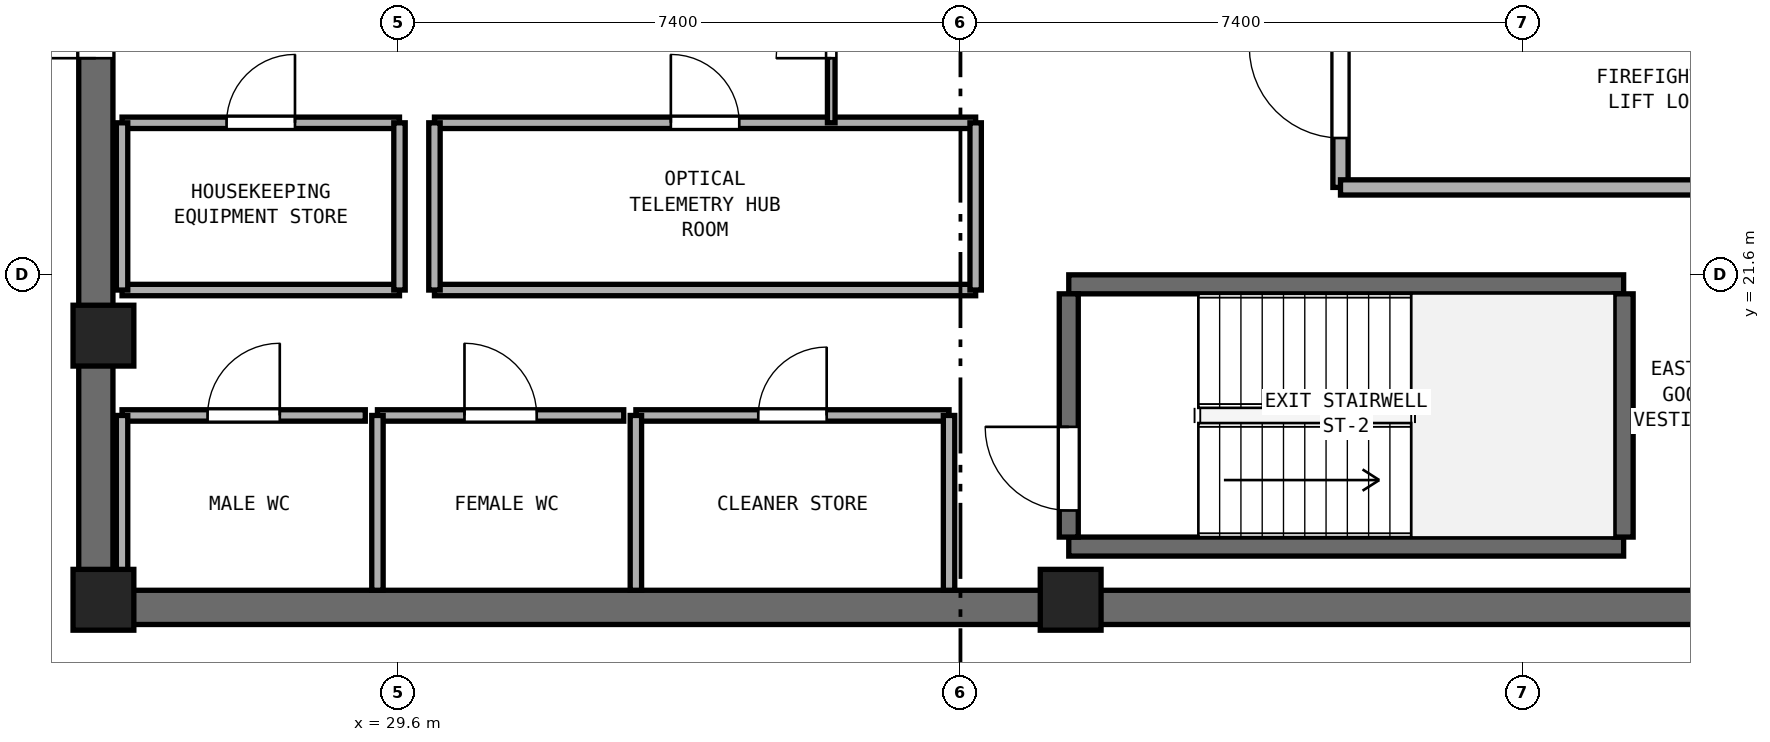
"""IFC4 building model, lengths in metres.
Left out: names, types, materials, properties, quantities, classifications, styles, units other than length and angle.
Written with IfcOpenShell. Run it as: python <this file> out.ifc"""

import sys

from ifc_helpers import new_model, si_unit, direction, frame, frame_2d, origin, origin_2d, place, context, subcontext, project, spatial, rectangle, extrude, element, fill, save


model = new_model("IFC4")
c1 = context("Model", 3, precision=1e-05, world=origin(), true_north=direction((0.0, 1.0)))
c2 = subcontext(c1, "Body", "Model", "MODEL_VIEW")
j1 = project(units=[si_unit("LENGTHUNIT", "METRE"), si_unit("PLANEANGLEUNIT", "RADIAN")], contexts=[c1])
p1 = place(None, origin())
s1 = spatial("IfcSite", under=j1, at=p1, CompositionType="ELEMENT")
p2 = place(p1, origin())
s2 = spatial("IfcBuilding", under=s1, at=p2, CompositionType="ELEMENT")
p3 = place(p2, frame((0.0, 0.0, 282.0)))
s3 = spatial("IfcBuildingStorey", under=s2, at=p3, CompositionType="ELEMENT", Elevation=282.0)
p4 = place(p3, frame((25.4, 17.225, 0.0), z_axis=(0.0, 0.0, 1.0), x_axis=(1.0, 0.0, 0.0)))
e1 = element("IfcWall", 1, at=p4, inside=s3, PredefinedType="SHEAR", context=c2, shape_type="SweptSolid", body=[
    extrude(rectangle(XDim=23.2, YDim=0.45, at=frame_2d((11.6, 0.0))), origin(), (0.0, 0.0, 1.0), 3.54),
])
p5 = place(p3, frame((25.625, 17.45, 0.0), z_axis=(0.0, 0.0, 1.0), x_axis=(0.0, 1.0, 0.0)))
e2 = element("IfcWall", 2, at=p5, inside=s3, PredefinedType="SHEAR", context=c2, shape_type="SweptSolid", body=[
    extrude(rectangle(XDim=15.5, YDim=0.45, at=frame_2d((7.75, 0.0))), origin(), (0.0, 0.0, 1.0), 3.54),
])
p6 = place(p5, frame((7.0, 0.0, 0.0)))
e3 = element("IfcOpeningElement", 3, at=p6, cuts=e2, PredefinedType="OPENING", context=c2, shape_type="SweptSolid", body=[
    extrude(rectangle(XDim=1.5, YDim=2.15, at=frame_2d((0.75, 1.075))), frame((0.0, 0.235, 0.0), z_axis=(0.0, -1.0, 0.0), x_axis=(1.0, 0.0, 0.0)), (0.0, 0.0, 1.0), 0.47),
])
for number, where, z_axis, x_axis in (
    (4, (25.725, 17.325, 0.0), (0.0, 0.0, 1.0), (1.0, 0.0, 0.0)),
    (5, (38.45, 17.325, 0.0), (0.0, 0.0, 1.0), (1.0, 0.0, 0.0)),
    (6, (25.725, 20.8, 0.0), (0.0, 0.0, 1.0), (1.0, 0.0, 0.0)),
):
    element("IfcColumn", number, at=place(p3, frame(where, z_axis=z_axis, x_axis=x_axis)), inside=s3, PredefinedType="PILASTER", context=c2, shape_type="SweptSolid", body=[
        extrude(rectangle(XDim=0.8, YDim=0.8, at=origin_2d()), origin(), (0.0, 0.0, 1.0), 3.8),
    ])
for number, where, z_axis, x_axis in (
    (7, (38.425, 18.025, 0.0), (0.0, 0.0, 1.0), (1.0, 0.0, 0.0)),
    (8, (38.425, 21.475, 0.0), (0.0, 0.0, 1.0), (1.0, 0.0, 0.0)),
):
    element("IfcWall", number, at=place(p3, frame(where, z_axis=z_axis, x_axis=x_axis)), inside=s3, PredefinedType="SHEAR", context=c2, shape_type="SweptSolid", body=[
        extrude(rectangle(XDim=7.3, YDim=0.25, at=frame_2d((3.65, 0.0))), origin(), (0.0, 0.0, 1.0), 3.54),
    ])
p7 = place(p3, frame((38.425, 18.15, 0.0), z_axis=(0.0, 0.0, 1.0), x_axis=(0.0, 1.0, 0.0)))
e9 = element("IfcWall", 9, at=p7, inside=s3, PredefinedType="SHEAR", context=c2, shape_type="SweptSolid", body=[
    extrude(rectangle(XDim=3.2, YDim=0.25, at=frame_2d((1.6, 0.0))), origin(), (0.0, 0.0, 1.0), 3.54),
])
p8 = place(p7, frame((0.35, 0.0, 0.0)))
e10 = element("IfcOpeningElement", 10, at=p8, cuts=e9, PredefinedType="OPENING", context=c2, shape_type="SweptSolid", body=[
    extrude(rectangle(XDim=1.1, YDim=2.15, at=frame_2d((0.55, 1.075))), frame((0.0, 0.135, 0.0), z_axis=(0.0, -1.0, 0.0), x_axis=(1.0, 0.0, 0.0)), (0.0, 0.0, 1.0), 0.27),
])
p9 = place(p3, frame((45.725, 18.15, 0.0), z_axis=(0.0, 0.0, 1.0), x_axis=(0.0, 1.0, 0.0)))
e11 = element("IfcWall", 11, at=p9, inside=s3, PredefinedType="SHEAR", context=c2, shape_type="SweptSolid", body=[
    extrude(rectangle(XDim=3.2, YDim=0.25, at=frame_2d((1.6, 0.0))), origin(), (0.0, 0.0, 1.0), 3.54),
])
p10 = place(p3, frame((42.0, 22.75, 0.0), z_axis=(0.0, 0.0, 1.0), x_axis=(0.0, 1.0, 0.0)))
e12 = element("IfcWall", 12, at=p10, inside=s3, PredefinedType="SOLIDWALL", context=c2, shape_type="SweptSolid", body=[
    extrude(rectangle(XDim=6.05, YDim=0.2, at=frame_2d((3.025, 0.0))), origin(), (0.0, 0.0, 1.0), 3.54),
])
p11 = place(p10, frame((0.65, 0.0, 0.0)))
e13 = element("IfcOpeningElement", 13, at=p11, cuts=e12, PredefinedType="OPENING", context=c2, shape_type="SweptSolid", body=[
    extrude(rectangle(XDim=1.2, YDim=2.15, at=frame_2d((0.6, 1.075))), frame((0.0, 0.11, 0.0), z_axis=(0.0, -1.0, 0.0), x_axis=(1.0, 0.0, 0.0)), (0.0, 0.0, 1.0), 0.22),
])
p12 = place(p3, frame((42.0, 22.75, 0.0), z_axis=(0.0, 0.0, 1.0), x_axis=(1.0, 0.0, 0.0)))
e14 = element("IfcWall", 14, at=p12, inside=s3, PredefinedType="SOLIDWALL", context=c2, shape_type="SweptSolid", body=[
    extrude(rectangle(XDim=6.15, YDim=0.2, at=frame_2d((3.075, 0.0))), origin(), (0.0, 0.0, 1.0), 3.54),
])
p13 = place(p3, frame((25.97, 19.75, 0.0), z_axis=(0.0, 0.0, 1.0), x_axis=(1.0, 0.0, 0.0)))
e15 = element("IfcWall", 15, at=p13, inside=s3, PredefinedType="PARTITIONING", context=c2, shape_type="SweptSolid", body=[
    extrude(rectangle(XDim=3.2, YDim=0.15, at=frame_2d((1.6, 0.0))), origin(), (0.0, 0.0, 1.0), 3.54),
])
p14 = place(p13, frame((1.125, 0.0, 0.0)))
e16 = element("IfcOpeningElement", 16, at=p14, cuts=e15, PredefinedType="OPENING", context=c2, shape_type="SweptSolid", body=[
    extrude(rectangle(XDim=0.95, YDim=2.1, at=frame_2d((0.475, 1.05))), frame((0.0, 0.085, 0.0), z_axis=(0.0, -1.0, 0.0), x_axis=(1.0, 0.0, 0.0)), (0.0, 0.0, 1.0), 0.17),
])
p15 = place(p3, frame((25.97, 17.45, 0.0), z_axis=(0.0, 0.0, 1.0), x_axis=(0.0, 1.0, 0.0)))
e17 = element("IfcWall", 17, at=p15, inside=s3, PredefinedType="PARTITIONING", context=c2, shape_type="SweptSolid", body=[
    extrude(rectangle(XDim=2.3, YDim=0.15, at=frame_2d((1.15, 0.0))), origin(), (0.0, 0.0, 1.0), 2.64),
])
p16 = place(p3, frame((29.33, 19.75, 0.0), z_axis=(0.0, 0.0, 1.0), x_axis=(1.0, 0.0, 0.0)))
e18 = element("IfcWall", 18, at=p16, inside=s3, PredefinedType="PARTITIONING", context=c2, shape_type="SweptSolid", body=[
    extrude(rectangle(XDim=3.24, YDim=0.15, at=frame_2d((1.62, 0.0))), origin(), (0.0, 0.0, 1.0), 3.54),
])
p17 = place(p16, frame((1.145, 0.0, 0.0)))
e19 = element("IfcOpeningElement", 19, at=p17, cuts=e18, PredefinedType="OPENING", context=c2, shape_type="SweptSolid", body=[
    extrude(rectangle(XDim=0.95, YDim=2.1, at=frame_2d((0.475, 1.05))), frame((0.0, 0.085, 0.0), z_axis=(0.0, -1.0, 0.0), x_axis=(1.0, 0.0, 0.0)), (0.0, 0.0, 1.0), 0.17),
])
p18 = place(p3, frame((29.33, 17.45, 0.0), z_axis=(0.0, 0.0, 1.0), x_axis=(0.0, 1.0, 0.0)))
e20 = element("IfcWall", 20, at=p18, inside=s3, PredefinedType="PARTITIONING", context=c2, shape_type="SweptSolid", body=[
    extrude(rectangle(XDim=2.3, YDim=0.15, at=frame_2d((1.15, 0.0))), origin(), (0.0, 0.0, 1.0), 3.54),
])
p19 = place(p3, frame((32.73, 19.75, 0.0), z_axis=(0.0, 0.0, 1.0), x_axis=(1.0, 0.0, 0.0)))
e21 = element("IfcWall", 21, at=p19, inside=s3, PredefinedType="PARTITIONING", context=c2, shape_type="SweptSolid", body=[
    extrude(rectangle(XDim=4.12, YDim=0.15, at=frame_2d((2.06, 0.0))), origin(), (0.0, 0.0, 1.0), 3.54),
])
p20 = place(p19, frame((1.61, 0.0, 0.0)))
e22 = element("IfcOpeningElement", 22, at=p20, cuts=e21, PredefinedType="OPENING", context=c2, shape_type="SweptSolid", body=[
    extrude(rectangle(XDim=0.9, YDim=2.1, at=frame_2d((0.45, 1.05))), frame((0.0, 0.085, 0.0), z_axis=(0.0, -1.0, 0.0), x_axis=(1.0, 0.0, 0.0)), (0.0, 0.0, 1.0), 0.17),
])
for number, where, z_axis, x_axis in (
    (23, (32.73, 17.45, 0.0), (0.0, 0.0, 1.0), (0.0, 1.0, 0.0)),
    (24, (36.85, 17.45, 0.0), (0.0, 0.0, 1.0), (0.0, 1.0, 0.0)),
):
    element("IfcWall", number, at=place(p3, frame(where, z_axis=z_axis, x_axis=x_axis)), inside=s3, PredefinedType="PARTITIONING", context=c2, shape_type="SweptSolid", body=[
        extrude(rectangle(XDim=2.3, YDim=0.15, at=frame_2d((1.15, 0.0))), origin(), (0.0, 0.0, 1.0), 3.54),
    ])
p21 = place(p3, frame((25.97, 21.4, 0.0), z_axis=(0.0, 0.0, 1.0), x_axis=(1.0, 0.0, 0.0)))
e25 = element("IfcWall", 25, at=p21, inside=s3, PredefinedType="PARTITIONING", context=c2, shape_type="SweptSolid", body=[
    extrude(rectangle(XDim=3.65, YDim=0.15, at=frame_2d((1.825, 0.0))), origin(), (0.0, 0.0, 1.0), 3.54),
])
p22 = place(p3, frame((25.97, 23.6, 0.0), z_axis=(0.0, 0.0, 1.0), x_axis=(1.0, 0.0, 0.0)))
e26 = element("IfcWall", 26, at=p22, inside=s3, PredefinedType="PARTITIONING", context=c2, shape_type="SweptSolid", body=[
    extrude(rectangle(XDim=3.65, YDim=0.15, at=frame_2d((1.825, 0.0))), origin(), (0.0, 0.0, 1.0), 3.54),
])
p23 = place(p22, frame((1.375, 0.0, 0.0)))
e27 = element("IfcOpeningElement", 27, at=p23, cuts=e26, PredefinedType="OPENING", context=c2, shape_type="SweptSolid", body=[
    extrude(rectangle(XDim=0.9, YDim=2.1, at=frame_2d((0.45, 1.05))), frame((0.0, 0.085, 0.0), z_axis=(0.0, -1.0, 0.0), x_axis=(1.0, 0.0, 0.0)), (0.0, 0.0, 1.0), 0.17),
])
p24 = place(p3, frame((25.97, 21.4, 0.0), z_axis=(0.0, 0.0, 1.0), x_axis=(0.0, 1.0, 0.0)))
e28 = element("IfcWall", 28, at=p24, inside=s3, PredefinedType="PARTITIONING", context=c2, shape_type="SweptSolid", body=[
    extrude(rectangle(XDim=2.2, YDim=0.15, at=frame_2d((1.1, 0.0))), origin(), (0.0, 0.0, 1.0), 2.64),
])
p25 = place(p3, frame((29.62, 21.4, 0.0), z_axis=(0.0, 0.0, 1.0), x_axis=(0.0, 1.0, 0.0)))
e29 = element("IfcWall", 29, at=p25, inside=s3, PredefinedType="PARTITIONING", context=c2, shape_type="SweptSolid", body=[
    extrude(rectangle(XDim=2.2, YDim=0.15, at=frame_2d((1.1, 0.0))), origin(), (0.0, 0.0, 1.0), 3.54),
])
p26 = place(p3, frame((30.08, 21.4, 0.0), z_axis=(0.0, 0.0, 1.0), x_axis=(1.0, 0.0, 0.0)))
e30 = element("IfcWall", 30, at=p26, inside=s3, PredefinedType="PARTITIONING", context=c2, shape_type="SweptSolid", body=[
    extrude(rectangle(XDim=7.12, YDim=0.15, at=frame_2d((3.56, 0.0))), origin(), (0.0, 0.0, 1.0), 3.54),
])
p27 = place(p3, frame((30.08, 23.6, 0.0), z_axis=(0.0, 0.0, 1.0), x_axis=(1.0, 0.0, 0.0)))
e31 = element("IfcWall", 31, at=p27, inside=s3, PredefinedType="PARTITIONING", context=c2, shape_type="SweptSolid", body=[
    extrude(rectangle(XDim=7.12, YDim=0.15, at=frame_2d((3.56, 0.0))), origin(), (0.0, 0.0, 1.0), 3.54),
])
p28 = place(p27, frame((3.11, 0.0, 0.0)))
e32 = element("IfcOpeningElement", 32, at=p28, cuts=e31, PredefinedType="OPENING", context=c2, shape_type="SweptSolid", body=[
    extrude(rectangle(XDim=0.9, YDim=2.1, at=frame_2d((0.45, 1.05))), frame((0.0, 0.085, 0.0), z_axis=(0.0, -1.0, 0.0), x_axis=(1.0, 0.0, 0.0)), (0.0, 0.0, 1.0), 0.17),
])
for number, where, z_axis, x_axis in (
    (33, (30.08, 21.4, 0.0), (0.0, 0.0, 1.0), (0.0, 1.0, 0.0)),
    (34, (37.2, 21.4, 0.0), (0.0, 0.0, 1.0), (0.0, 1.0, 0.0)),
):
    element("IfcWall", number, at=place(p3, frame(where, z_axis=z_axis, x_axis=x_axis)), inside=s3, PredefinedType="PARTITIONING", context=c2, shape_type="SweptSolid", body=[
        extrude(rectangle(XDim=2.2, YDim=0.15, at=frame_2d((1.1, 0.0))), origin(), (0.0, 0.0, 1.0), 3.54),
    ])
p29 = place(p3, frame((35.3, 23.6, 0.0), z_axis=(0.0, 0.0, 1.0), x_axis=(0.0, 1.0, 0.0)))
e35 = element("IfcWall", 35, at=p29, inside=s3, PredefinedType="PARTITIONING", context=c2, shape_type="SweptSolid", body=[
    extrude(rectangle(XDim=3.2, YDim=0.1, at=frame_2d((1.6, 0.0))), origin(), (0.0, 0.0, 1.0), 3.54),
])
p30 = place(p29, frame((0.85, 0.0, 0.0)))
e36 = element("IfcOpeningElement", 36, at=p30, cuts=e35, PredefinedType="OPENING", context=c2, shape_type="SweptSolid", body=[
    extrude(rectangle(XDim=1.45, YDim=2.12, at=frame_2d((0.725, 1.06))), frame((0.0, 0.06, 0.0), z_axis=(0.0, -1.0, 0.0), x_axis=(1.0, 0.0, 0.0)), (0.0, 0.0, 1.0), 0.12),
])
p31 = place(p8, origin())
e37 = element("IfcDoor", 37, at=p31, inside=s3, OperationType="SINGLE_SWING_RIGHT", PredefinedType="DOOR", context=c2, shape_type="SweptSolid", body=[
    extrude(rectangle(XDim=1.1, YDim=2.15, at=frame_2d((0.55, 1.075))), frame((0.0, 0.025, 0.0), z_axis=(0.0, -1.0, 0.0), x_axis=(1.0, 0.0, 0.0)), (0.0, 0.0, 1.0), 0.05),
])
fill(e10, e37)
p32 = place(p11, origin())
e38 = element("IfcDoor", 38, at=p32, inside=s3, OperationType="SINGLE_SWING_RIGHT", PredefinedType="DOOR", context=c2, shape_type="SweptSolid", body=[
    extrude(rectangle(XDim=1.2, YDim=2.15, at=frame_2d((0.6, 1.075))), frame((0.0, 0.025, 0.0), z_axis=(0.0, -1.0, 0.0), x_axis=(1.0, 0.0, 0.0)), (0.0, 0.0, 1.0), 0.05),
])
fill(e13, e38)
p33 = place(p6, origin())
e39 = element("IfcDoor", 39, at=p33, inside=s3, OperationType="DOUBLE_DOOR_SINGLE_SWING", PredefinedType="DOOR", context=c2, shape_type="SweptSolid", body=[
    extrude(rectangle(XDim=1.5, YDim=2.15, at=frame_2d((0.75, 1.075))), frame((0.0, 0.025, 0.0), z_axis=(0.0, -1.0, 0.0), x_axis=(1.0, 0.0, 0.0)), (0.0, 0.0, 1.0), 0.05),
])
fill(e3, e39)
p34 = place(p14, origin())
e40 = element("IfcDoor", 40, at=p34, inside=s3, OperationType="SINGLE_SWING_RIGHT", PredefinedType="DOOR", context=c2, shape_type="SweptSolid", body=[
    extrude(rectangle(XDim=0.95, YDim=2.1, at=frame_2d((0.475, 1.05))), frame((0.0, 0.025, 0.0), z_axis=(0.0, -1.0, 0.0), x_axis=(1.0, 0.0, 0.0)), (0.0, 0.0, 1.0), 0.05),
])
fill(e16, e40)
p35 = place(p17, origin())
e41 = element("IfcDoor", 41, at=p35, inside=s3, OperationType="SINGLE_SWING_LEFT", PredefinedType="DOOR", context=c2, shape_type="SweptSolid", body=[
    extrude(rectangle(XDim=0.95, YDim=2.1, at=frame_2d((0.475, 1.05))), frame((0.0, 0.025, 0.0), z_axis=(0.0, -1.0, 0.0), x_axis=(1.0, 0.0, 0.0)), (0.0, 0.0, 1.0), 0.05),
])
fill(e19, e41)
p36 = place(p20, origin())
e42 = element("IfcDoor", 42, at=p36, inside=s3, OperationType="SINGLE_SWING_RIGHT", PredefinedType="DOOR", context=c2, shape_type="SweptSolid", body=[
    extrude(rectangle(XDim=0.9, YDim=2.1, at=frame_2d((0.45, 1.05))), frame((0.0, 0.025, 0.0), z_axis=(0.0, -1.0, 0.0), x_axis=(1.0, 0.0, 0.0)), (0.0, 0.0, 1.0), 0.05),
])
fill(e22, e42)
p37 = place(p23, origin())
e43 = element("IfcDoor", 43, at=p37, inside=s3, OperationType="SINGLE_SWING_RIGHT", PredefinedType="DOOR", context=c2, shape_type="SweptSolid", body=[
    extrude(rectangle(XDim=0.9, YDim=2.1, at=frame_2d((0.45, 1.05))), frame((0.0, 0.025, 0.0), z_axis=(0.0, -1.0, 0.0), x_axis=(1.0, 0.0, 0.0)), (0.0, 0.0, 1.0), 0.05),
])
fill(e27, e43)
p38 = place(p28, origin())
e44 = element("IfcDoor", 44, at=p38, inside=s3, OperationType="SINGLE_SWING_LEFT", PredefinedType="DOOR", context=c2, shape_type="SweptSolid", body=[
    extrude(rectangle(XDim=0.9, YDim=2.1, at=frame_2d((0.45, 1.05))), frame((0.0, 0.025, 0.0), z_axis=(0.0, -1.0, 0.0), x_axis=(1.0, 0.0, 0.0)), (0.0, 0.0, 1.0), 0.05),
])
fill(e32, e44)
p39 = place(p30, origin())
e45 = element("IfcDoor", 45, at=p39, inside=s3, OperationType="DOUBLE_DOOR_SINGLE_SWING", PredefinedType="DOOR", context=c2, shape_type="SweptSolid", body=[
    extrude(rectangle(XDim=1.45, YDim=2.12, at=frame_2d((0.725, 1.06))), frame((0.0, 0.025, 0.0), z_axis=(0.0, -1.0, 0.0), x_axis=(1.0, 0.0, 0.0)), (0.0, 0.0, 1.0), 0.05),
])
fill(e36, e45)
save(model, sys.argv[1])
